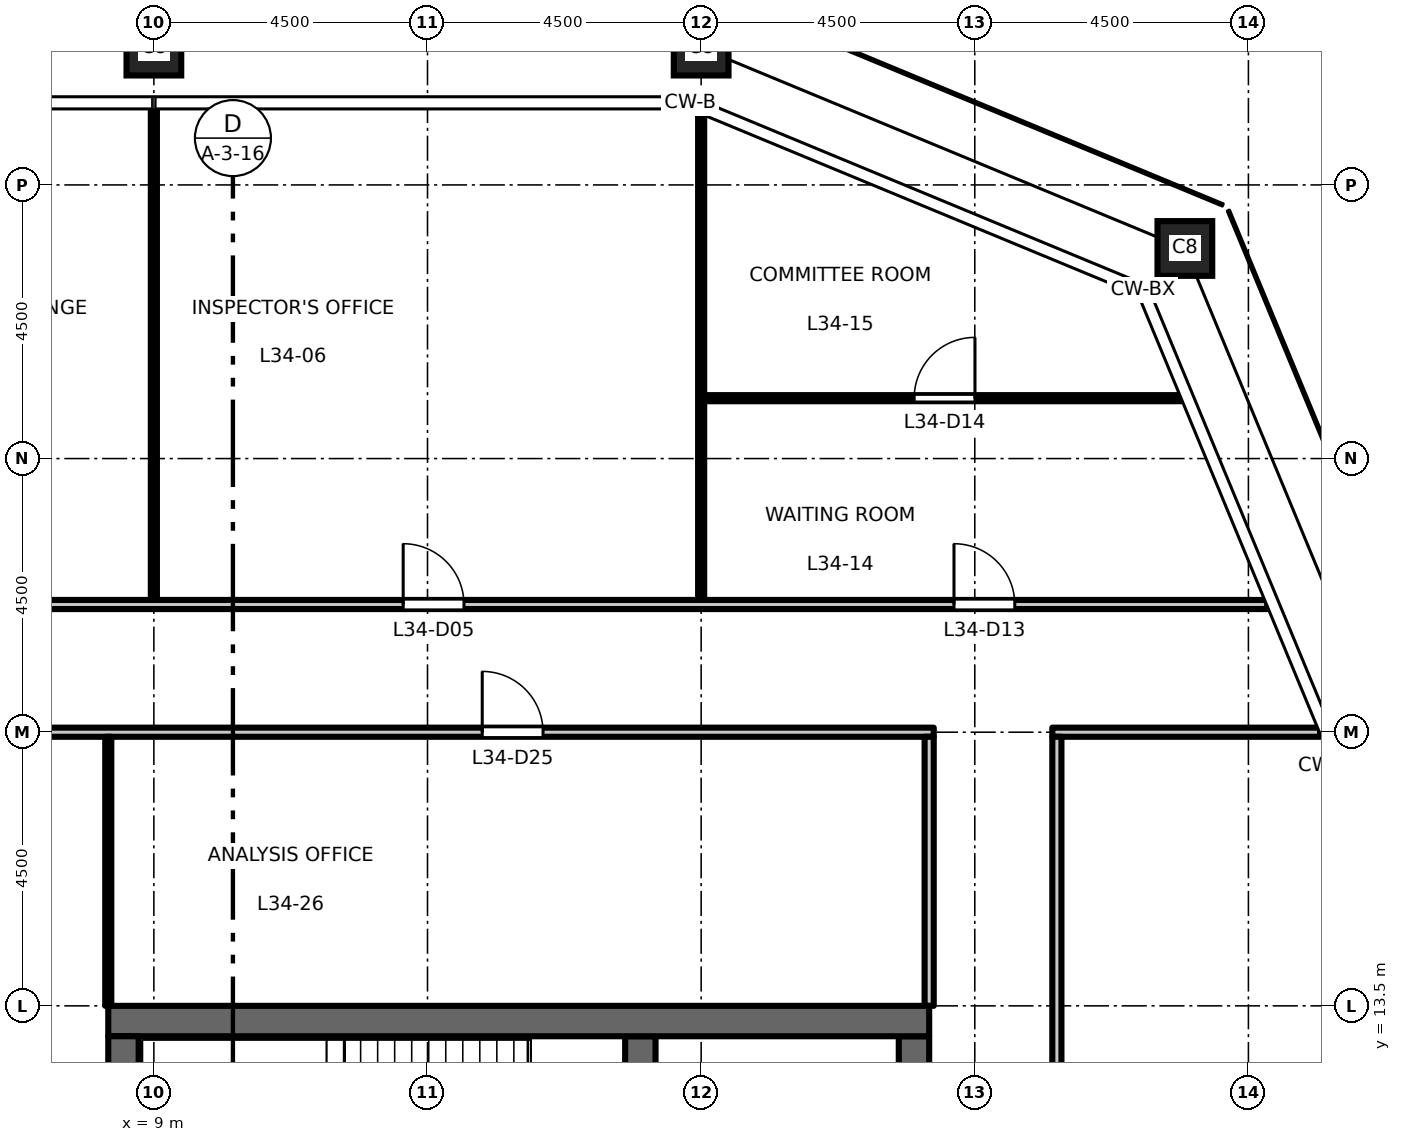
"""IFC4 building model, lengths in metres.
Left out: names, types, materials, properties, quantities, classifications, styles, units other than length and angle.
Written with IfcOpenShell. Run it as: python <this file> out.ifc"""

import sys

from ifc_helpers import new_model, si_unit, direction, frame, frame_2d, origin, origin_2d, place, context, subcontext, project, spatial, rectangle, hollow_rectangle, extrude, element, fill, save


model = new_model("IFC4")
c1 = context("Model", 3, precision=1e-05, world=origin(), true_north=direction((0.0, 1.0)))
c2 = subcontext(c1, "Body", "Model", "MODEL_VIEW")
j1 = project(units=[si_unit("LENGTHUNIT", "METRE"), si_unit("PLANEANGLEUNIT", "RADIAN")], contexts=[c1])
p1 = place(None, origin())
s1 = spatial("IfcSite", under=j1, at=p1, CompositionType="ELEMENT")
p2 = place(p1, origin())
s2 = spatial("IfcBuilding", under=s1, at=p2, CompositionType="ELEMENT")
p3 = place(p2, frame((0.0, 0.0, 158.7)))
s3 = spatial("IfcBuildingStorey", under=s2, at=p3, CompositionType="ELEMENT", Elevation=158.7)
for number, where, z_axis, x_axis in (
    (1, (25.955, 25.955, 0.0), (0.0, 0.0, 1.0), (1.0, 0.0, 0.0)),
    (2, (18.0, 29.25, 0.0), (0.0, 0.0, 1.0), (1.0, 0.0, 0.0)),
    (3, (9.0, 29.25, 0.0), (0.0, 0.0, 1.0), (1.0, 0.0, 0.0)),
):
    element("IfcColumn", number, at=place(p3, frame(where, z_axis=z_axis, x_axis=x_axis)), inside=s3, PredefinedType="COLUMN", context=c2, shape_type="SweptSolid", body=[
        extrude(hollow_rectangle(XDim=0.9, YDim=0.9, WallThickness=0.05, at=origin_2d()), origin(), (0.0, 0.0, 1.0), 4.5),
    ])
p4 = place(p3, frame((21.5, -13.0, 0.0), z_axis=(0.0, 0.0, 1.0), x_axis=(0.0, 1.0, 0.0)))
e4 = element("IfcWall", 4, at=p4, inside=s3, PredefinedType="SHEAR", context=c2, shape_type="SweptSolid", body=[
    extrude(rectangle(XDim=26.0, YDim=0.5, at=frame_2d((13.0, 0.0))), origin(), (0.0, 0.0, 1.0), 4.35),
])
p5 = place(p4, frame((16.825, 0.0, 0.0)))
e5 = element("IfcOpeningElement", 5, at=p5, cuts=e4, PredefinedType="OPENING", context=c2, shape_type="SweptSolid", body=[
    extrude(rectangle(XDim=1.8, YDim=2.1, at=frame_2d((0.9, 1.05))), frame((0.0, 0.26, 0.0), z_axis=(0.0, -1.0, 0.0), x_axis=(1.0, 0.0, 0.0)), (0.0, 0.0, 1.0), 0.52),
])
p6 = place(p4, frame((7.375, 0.0, 0.0)))
e6 = element("IfcOpeningElement", 6, at=p6, cuts=e4, PredefinedType="OPENING", context=c2, shape_type="SweptSolid", body=[
    extrude(rectangle(XDim=1.8, YDim=2.1, at=frame_2d((0.9, 1.05))), frame((0.0, 0.26, 0.0), z_axis=(0.0, -1.0, 0.0), x_axis=(1.0, 0.0, 0.0)), (0.0, 0.0, 1.0), 0.52),
])
p7 = place(p4, frame((23.8, 0.0, 0.0)))
e7 = element("IfcOpeningElement", 7, at=p7, cuts=e4, PredefinedType="OPENING", context=c2, shape_type="SweptSolid", body=[
    extrude(rectangle(XDim=0.9, YDim=2.1, at=frame_2d((0.45, 1.05))), frame((0.0, 0.26, 0.0), z_axis=(0.0, -1.0, 0.0), x_axis=(1.0, 0.0, 0.0)), (0.0, 0.0, 1.0), 0.52),
])
p8 = place(p3, frame((17.0, 6.425, 0.0), z_axis=(0.0, 0.0, 1.0), x_axis=(0.0, 1.0, 0.0)))
e8 = element("IfcWall", 8, at=p8, inside=s3, PredefinedType="SHEAR", context=c2, shape_type="SweptSolid", body=[
    extrude(rectangle(XDim=6.575, YDim=0.5, at=frame_2d((3.288, 0.0))), origin(), (0.0, 0.0, 1.0), 4.35),
])
p9 = place(p3, frame((8.25, 13.25, 0.0), z_axis=(0.0, 0.0, 1.0), x_axis=(1.0, 0.0, 0.0)))
e9 = element("IfcWall", 9, at=p9, inside=s3, PredefinedType="SHEAR", context=c2, shape_type="SweptSolid", body=[
    extrude(rectangle(XDim=13.5, YDim=0.5, at=frame_2d((6.75, 0.0))), origin(), (0.0, 0.0, 1.0), 4.35),
])
p10 = place(p3, frame((8.5, -13.0, 0.0), z_axis=(0.0, 0.0, 1.0), x_axis=(0.0, 1.0, 0.0)))
e10 = element("IfcWall", 10, at=p10, inside=s3, PredefinedType="SHEAR", context=c2, shape_type="SweptSolid", body=[
    extrude(rectangle(XDim=26.0, YDim=0.5, at=frame_2d((13.0, 0.0))), origin(), (0.0, 0.0, 1.0), 4.35),
])
p11 = place(p3, frame((0.0, 18.0, 0.0), z_axis=(0.0, 0.0, 1.0), x_axis=(1.0, 0.0, 0.0)))
e11 = element("IfcWall", 11, at=p11, inside=s3, PredefinedType="PARTITIONING", context=c2, shape_type="SweptSolid", body=[
    extrude(rectangle(XDim=21.825, YDim=0.15, at=frame_2d((10.913, 0.0))), origin(), (0.0, 0.0, 1.0), 4.35),
])
p12 = place(p11, frame((3.65, 0.0, 0.0)))
e12 = element("IfcOpeningElement", 12, at=p12, cuts=e11, PredefinedType="OPENING", context=c2, shape_type="SweptSolid", body=[
    extrude(rectangle(XDim=1.0, YDim=2.1, at=frame_2d((0.5, 1.05))), frame((0.0, 0.085, 0.0), z_axis=(0.0, -1.0, 0.0), x_axis=(1.0, 0.0, 0.0)), (0.0, 0.0, 1.0), 0.17),
])
p13 = place(p11, frame((14.4, 0.0, 0.0)))
e13 = element("IfcOpeningElement", 13, at=p13, cuts=e11, PredefinedType="OPENING", context=c2, shape_type="SweptSolid", body=[
    extrude(rectangle(XDim=1.0, YDim=2.1, at=frame_2d((0.5, 1.05))), frame((0.0, 0.085, 0.0), z_axis=(0.0, -1.0, 0.0), x_axis=(1.0, 0.0, 0.0)), (0.0, 0.0, 1.0), 0.17),
])
p14 = place(p3, frame((23.775, 18.0, 0.0), z_axis=(0.0, 0.0, 1.0), x_axis=(1.0, 0.0, 0.0)))
e14 = element("IfcWall", 14, at=p14, inside=s3, PredefinedType="PARTITIONING", context=c2, shape_type="SweptSolid", body=[
    extrude(rectangle(XDim=4.403, YDim=0.15, at=frame_2d((2.202, 0.0))), origin(), (0.0, 0.0, 1.0), 4.35),
])
p15 = place(p3, frame((-27.308, 20.1, 0.0), z_axis=(0.0, 0.0, 1.0), x_axis=(1.0, 0.0, 0.0)))
e15 = element("IfcWall", 15, at=p15, inside=s3, PredefinedType="PARTITIONING", context=c2, shape_type="SweptSolid", body=[
    extrude(rectangle(XDim=54.616, YDim=0.15, at=frame_2d((27.308, 0.0))), origin(), (0.0, 0.0, 1.0), 4.35),
])
p16 = place(p15, frame((13.408, 0.0, 0.0)))
e16 = element("IfcOpeningElement", 16, at=p16, cuts=e15, PredefinedType="OPENING", context=c2, shape_type="SweptSolid", body=[
    extrude(rectangle(XDim=1.0, YDim=2.1, at=frame_2d((0.5, 1.05))), frame((0.0, 0.085, 0.0), z_axis=(0.0, -1.0, 0.0), x_axis=(1.0, 0.0, 0.0)), (0.0, 0.0, 1.0), 0.17),
])
p17 = place(p15, frame((22.408, 0.0, 0.0)))
e17 = element("IfcOpeningElement", 17, at=p17, cuts=e15, PredefinedType="OPENING", context=c2, shape_type="SweptSolid", body=[
    extrude(rectangle(XDim=1.0, YDim=2.1, at=frame_2d((0.5, 1.05))), frame((0.0, 0.085, 0.0), z_axis=(0.0, -1.0, 0.0), x_axis=(1.0, 0.0, 0.0)), (0.0, 0.0, 1.0), 0.17),
])
p18 = place(p15, frame((31.408, 0.0, 0.0)))
e18 = element("IfcOpeningElement", 18, at=p18, cuts=e15, PredefinedType="OPENING", context=c2, shape_type="SweptSolid", body=[
    extrude(rectangle(XDim=1.0, YDim=2.1, at=frame_2d((0.5, 1.05))), frame((0.0, 0.085, 0.0), z_axis=(0.0, -1.0, 0.0), x_axis=(1.0, 0.0, 0.0)), (0.0, 0.0, 1.0), 0.17),
])
p19 = place(p15, frame((40.408, 0.0, 0.0)))
e19 = element("IfcOpeningElement", 19, at=p19, cuts=e15, PredefinedType="OPENING", context=c2, shape_type="SweptSolid", body=[
    extrude(rectangle(XDim=1.0, YDim=2.1, at=frame_2d((0.5, 1.05))), frame((0.0, 0.085, 0.0), z_axis=(0.0, -1.0, 0.0), x_axis=(1.0, 0.0, 0.0)), (0.0, 0.0, 1.0), 0.17),
])
p20 = place(p15, frame((4.158, 0.0, 0.0)))
e20 = element("IfcOpeningElement", 20, at=p20, cuts=e15, PredefinedType="OPENING", context=c2, shape_type="SweptSolid", body=[
    extrude(rectangle(XDim=1.0, YDim=2.1, at=frame_2d((0.5, 1.05))), frame((0.0, 0.085, 0.0), z_axis=(0.0, -1.0, 0.0), x_axis=(1.0, 0.0, 0.0)), (0.0, 0.0, 1.0), 0.17),
])
p21 = place(p15, frame((49.466, 0.0, 0.0)))
e21 = element("IfcOpeningElement", 21, at=p21, cuts=e15, PredefinedType="OPENING", context=c2, shape_type="SweptSolid", body=[
    extrude(rectangle(XDim=1.0, YDim=2.1, at=frame_2d((0.5, 1.05))), frame((0.0, 0.085, 0.0), z_axis=(0.0, -1.0, 0.0), x_axis=(1.0, 0.0, 0.0)), (0.0, 0.0, 1.0), 0.17),
])
p22 = place(p3, frame((18.05, 23.493, 0.0), z_axis=(0.0, 0.0, 1.0), x_axis=(1.0, 0.0, 0.0)))
e22 = element("IfcWall", 22, at=p22, inside=s3, PredefinedType="PARTITIONING", context=c2, shape_type="SweptSolid", body=[
    extrude(rectangle(XDim=7.853, YDim=0.1, at=frame_2d((3.927, 0.0))), origin(), (0.0, 0.0, 1.0), 4.35),
])
p23 = place(p22, frame((3.453, 0.0, 0.0)))
e23 = element("IfcOpeningElement", 23, at=p23, cuts=e22, PredefinedType="OPENING", context=c2, shape_type="SweptSolid", body=[
    extrude(rectangle(XDim=1.0, YDim=2.1, at=frame_2d((0.5, 1.05))), frame((0.0, 0.06, 0.0), z_axis=(0.0, -1.0, 0.0), x_axis=(1.0, 0.0, 0.0)), (0.0, 0.0, 1.0), 0.12),
])
p24 = place(p3, frame((8.25, 13.5, 0.0), z_axis=(0.0, 0.0, 1.0), x_axis=(0.0, 1.0, 0.0)))
e24 = element("IfcWall", 24, at=p24, inside=s3, PredefinedType="PARTITIONING", context=c2, shape_type="SweptSolid", body=[
    extrude(rectangle(XDim=4.425, YDim=0.1, at=frame_2d((2.212, 0.0))), origin(), (0.0, 0.0, 1.0), 4.35),
])
p25 = place(p3, frame((9.0, 20.175, 0.0), z_axis=(0.0, 0.0, 1.0), x_axis=(0.0, 1.0, 0.0)))
e25 = element("IfcWall", 25, at=p25, inside=s3, PredefinedType="PARTITIONING", context=c2, shape_type="SweptSolid", body=[
    extrude(rectangle(XDim=8.085, YDim=0.1, at=frame_2d((4.042, 0.0))), origin(), (0.0, 0.0, 1.0), 3.45),
])
p26 = place(p3, frame((18.0, 20.175, 0.0), z_axis=(0.0, 0.0, 1.0), x_axis=(0.0, 1.0, 0.0)))
e26 = element("IfcWall", 26, at=p26, inside=s3, PredefinedType="PARTITIONING", context=c2, shape_type="SweptSolid", body=[
    extrude(rectangle(XDim=8.003, YDim=0.1, at=frame_2d((4.001, 0.0))), origin(), (0.0, 0.0, 1.0), 3.45),
])
p27 = place(p3, frame((21.75, 13.5, 0.0), z_axis=(0.0, 0.0, 1.0), x_axis=(0.0, 1.0, 0.0)))
e27 = element("IfcWall", 27, at=p27, inside=s3, PredefinedType="PARTITIONING", context=c2, shape_type="SweptSolid", body=[
    extrude(rectangle(XDim=4.425, YDim=0.15, at=frame_2d((2.212, 0.0))), origin(), (0.0, 0.0, 1.0), 4.35),
])
p28 = place(p3, frame((23.85, -17.925, 0.0), z_axis=(0.0, 0.0, 1.0), x_axis=(0.0, 1.0, 0.0)))
e28 = element("IfcWall", 28, at=p28, inside=s3, PredefinedType="PARTITIONING", context=c2, shape_type="SweptSolid", body=[
    extrude(rectangle(XDim=35.85, YDim=0.15, at=frame_2d((17.925, 0.0))), origin(), (0.0, 0.0, 1.0), 4.35),
])
p29 = place(p28, frame((17.325, 0.0, 0.0)))
e29 = element("IfcOpeningElement", 29, at=p29, cuts=e28, PredefinedType="OPENING", context=c2, shape_type="SweptSolid", body=[
    extrude(rectangle(XDim=1.0, YDim=2.1, at=frame_2d((0.5, 1.05))), frame((0.0, 0.085, 0.0), z_axis=(0.0, -1.0, 0.0), x_axis=(1.0, 0.0, 0.0)), (0.0, 0.0, 1.0), 0.17),
])
p30 = place(p19, origin())
e30 = element("IfcDoor", 30, at=p30, inside=s3, OperationType="SINGLE_SWING_LEFT", PredefinedType="DOOR", context=c2, shape_type="SweptSolid", body=[
    extrude(rectangle(XDim=1.0, YDim=2.1, at=frame_2d((0.5, 1.05))), frame((0.0, 0.025, 0.0), z_axis=(0.0, -1.0, 0.0), x_axis=(1.0, 0.0, 0.0)), (0.0, 0.0, 1.0), 0.05),
])
fill(e19, e30)
p31 = place(p21, origin())
e31 = element("IfcDoor", 31, at=p31, inside=s3, OperationType="SINGLE_SWING_LEFT", PredefinedType="DOOR", context=c2, shape_type="SweptSolid", body=[
    extrude(rectangle(XDim=1.0, YDim=2.1, at=frame_2d((0.5, 1.05))), frame((0.0, 0.025, 0.0), z_axis=(0.0, -1.0, 0.0), x_axis=(1.0, 0.0, 0.0)), (0.0, 0.0, 1.0), 0.05),
])
fill(e21, e31)
p32 = place(p23, origin())
e32 = element("IfcDoor", 32, at=p32, inside=s3, OperationType="SINGLE_SWING_RIGHT", PredefinedType="DOOR", context=c2, shape_type="SweptSolid", body=[
    extrude(rectangle(XDim=1.0, YDim=2.1, at=frame_2d((0.5, 1.05))), frame((0.0, 0.025, 0.0), z_axis=(0.0, -1.0, 0.0), x_axis=(1.0, 0.0, 0.0)), (0.0, 0.0, 1.0), 0.05),
])
fill(e23, e32)
p33 = place(p13, origin())
e33 = element("IfcDoor", 33, at=p33, inside=s3, OperationType="SINGLE_SWING_LEFT", PredefinedType="DOOR", context=c2, shape_type="SweptSolid", body=[
    extrude(rectangle(XDim=1.0, YDim=2.1, at=frame_2d((0.5, 1.05))), frame((0.0, 0.025, 0.0), z_axis=(0.0, -1.0, 0.0), x_axis=(1.0, 0.0, 0.0)), (0.0, 0.0, 1.0), 0.05),
])
fill(e13, e33)
save(model, sys.argv[1])
